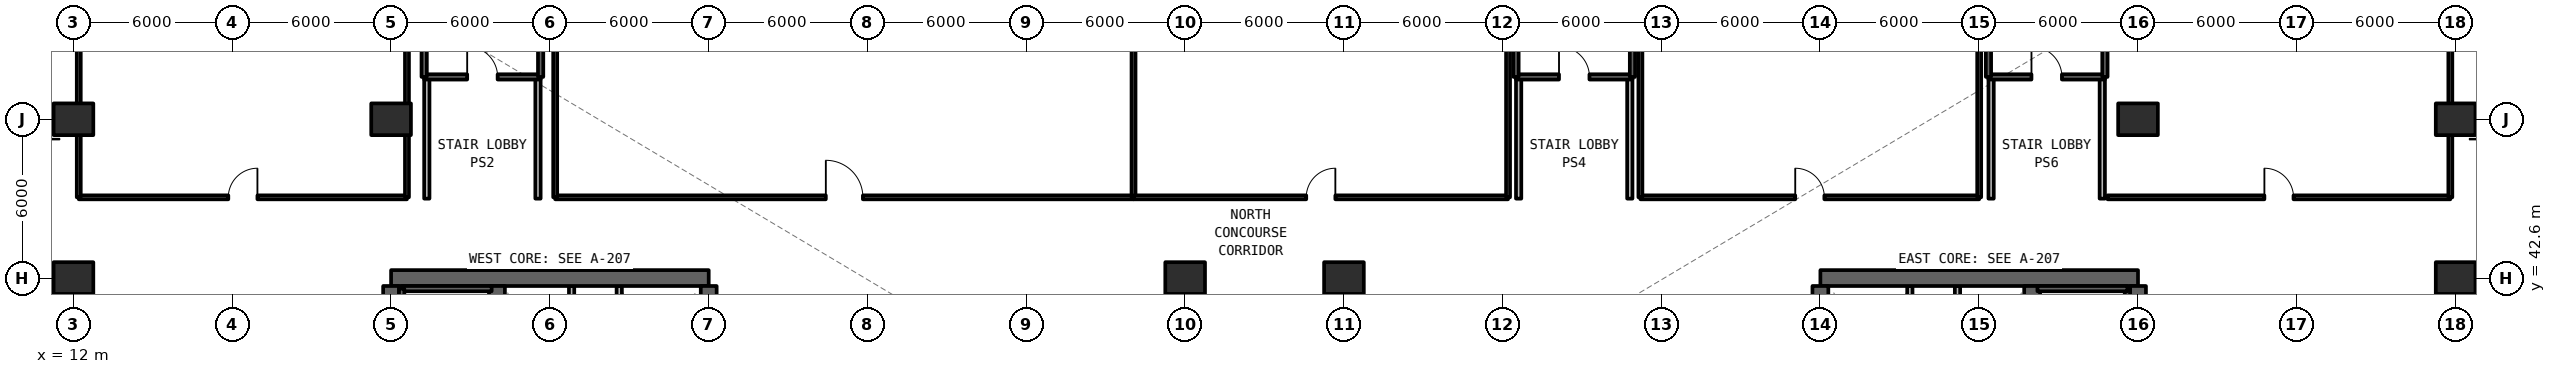
"""IFC4 building model, lengths in metres.
Left out: names, types, materials, properties, quantities, classifications, styles, units other than length and angle.
Written with IfcOpenShell. Run it as: python <this file> out.ifc"""

import sys

from ifc_helpers import new_model, si_unit, direction, frame, frame_2d, origin, origin_2d, place, context, subcontext, project, spatial, rectangle, extrude, element, fill, save


model = new_model("IFC4")
c1 = context("Model", 3, precision=1e-05, world=origin(), true_north=direction((0.0, 1.0)))
c2 = subcontext(c1, "Body", "Model", "MODEL_VIEW")
j1 = project(units=[si_unit("LENGTHUNIT", "METRE"), si_unit("PLANEANGLEUNIT", "RADIAN")], contexts=[c1])
p1 = place(None, origin())
s1 = spatial("IfcSite", under=j1, at=p1, CompositionType="ELEMENT")
p2 = place(p1, origin())
s2 = spatial("IfcBuilding", under=s1, at=p2, CompositionType="ELEMENT")
p3 = place(p2, frame((0.0, 0.0, 24.09)))
s3 = spatial("IfcBuildingStorey", under=s2, at=p3, CompositionType="ELEMENT", Elevation=24.09)
p4 = place(p3, frame((36.0, 42.6, 0.0), z_axis=(0.0, 0.0, 1.0), x_axis=(-1.0, 0.0, 0.0)))
e1 = element("IfcWall", 1, at=p4, inside=s3, PredefinedType="SHEAR", context=c2, shape_type="SweptSolid", body=[
    extrude(rectangle(XDim=12.0, YDim=0.6, at=frame_2d((6.0, 0.0))), origin(), (0.0, 0.0, 1.0), 4.95),
])
p5 = place(p3, frame((24.0, 24.9, 0.0), z_axis=(0.0, 0.0, 1.0), x_axis=(0.0, 1.0, 0.0)))
e2 = element("IfcWall", 2, at=p5, inside=s3, PredefinedType="SHEAR", context=c2, shape_type="SweptSolid", body=[
    extrude(rectangle(XDim=17.4, YDim=0.6, at=frame_2d((8.7, 0.0))), origin(), (0.0, 0.0, 1.0), 4.95),
])
p6 = place(p3, frame((36.0, 36.8, 0.0), z_axis=(0.0, 0.0, 1.0), x_axis=(0.0, 1.0, 0.0)))
e3 = element("IfcWall", 3, at=p6, inside=s3, PredefinedType="SHEAR", context=c2, shape_type="SweptSolid", body=[
    extrude(rectangle(XDim=5.5, YDim=0.6, at=frame_2d((2.75, 0.0))), origin(), (0.0, 0.0, 1.0), 4.95),
])
p7 = place(p3, frame((28.0, 24.9, 0.0), z_axis=(0.0, 0.0, 1.0), x_axis=(0.0, 1.0, 0.0)))
e4 = element("IfcWall", 4, at=p7, inside=s3, PredefinedType="SHEAR", context=c2, shape_type="SweptSolid", body=[
    extrude(rectangle(XDim=17.4, YDim=0.6, at=frame_2d((8.7, 0.0))), origin(), (0.0, 0.0, 1.0), 4.95),
])
p8 = place(p7, frame((0.35, 0.0, 0.0)))
e5 = element("IfcOpeningElement", 5, at=p8, cuts=e4, PredefinedType="OPENING", context=c2, shape_type="SweptSolid", body=[
    extrude(rectangle(XDim=1.15, YDim=2.15, at=frame_2d((0.575, 1.075))), frame((0.0, 0.31, 0.0), z_axis=(0.0, -1.0, 0.0), x_axis=(1.0, 0.0, 0.0)), (0.0, 0.0, 1.0), 0.62),
])
p9 = place(p7, frame((9.55, 0.0, 0.0)))
e6 = element("IfcOpeningElement", 6, at=p9, cuts=e4, PredefinedType="OPENING", context=c2, shape_type="SweptSolid", body=[
    extrude(rectangle(XDim=1.15, YDim=2.15, at=frame_2d((0.575, 1.075))), frame((0.0, 0.31, 0.0), z_axis=(0.0, -1.0, 0.0), x_axis=(1.0, 0.0, 0.0)), (0.0, 0.0, 1.0), 0.62),
])
p10 = place(p3, frame((90.0, 42.6, 0.0), z_axis=(0.0, 0.0, 1.0), x_axis=(-1.0, 0.0, 0.0)))
e7 = element("IfcWall", 7, at=p10, inside=s3, PredefinedType="SHEAR", context=c2, shape_type="SweptSolid", body=[
    extrude(rectangle(XDim=12.0, YDim=0.6, at=frame_2d((6.0, 0.0))), origin(), (0.0, 0.0, 1.0), 4.95),
])
p11 = place(p3, frame((90.0, 24.9, 0.0), z_axis=(0.0, 0.0, 1.0), x_axis=(0.0, 1.0, 0.0)))
e8 = element("IfcWall", 8, at=p11, inside=s3, PredefinedType="SHEAR", context=c2, shape_type="SweptSolid", body=[
    extrude(rectangle(XDim=17.4, YDim=0.6, at=frame_2d((8.7, 0.0))), origin(), (0.0, 0.0, 1.0), 4.95),
])
p12 = place(p3, frame((78.0, 36.8, 0.0), z_axis=(0.0, 0.0, 1.0), x_axis=(0.0, 1.0, 0.0)))
e9 = element("IfcWall", 9, at=p12, inside=s3, PredefinedType="SHEAR", context=c2, shape_type="SweptSolid", body=[
    extrude(rectangle(XDim=5.5, YDim=0.6, at=frame_2d((2.75, 0.0))), origin(), (0.0, 0.0, 1.0), 4.95),
])
p13 = place(p3, frame((86.0, 24.9, 0.0), z_axis=(0.0, 0.0, 1.0), x_axis=(0.0, 1.0, 0.0)))
e10 = element("IfcWall", 10, at=p13, inside=s3, PredefinedType="SHEAR", context=c2, shape_type="SweptSolid", body=[
    extrude(rectangle(XDim=17.4, YDim=0.6, at=frame_2d((8.7, 0.0))), origin(), (0.0, 0.0, 1.0), 4.95),
])
p14 = place(p13, frame((0.35, 0.0, 0.0)))
e11 = element("IfcOpeningElement", 11, at=p14, cuts=e10, PredefinedType="OPENING", context=c2, shape_type="SweptSolid", body=[
    extrude(rectangle(XDim=1.15, YDim=2.15, at=frame_2d((0.575, 1.075))), frame((0.0, 0.31, 0.0), z_axis=(0.0, -1.0, 0.0), x_axis=(1.0, 0.0, 0.0)), (0.0, 0.0, 1.0), 0.62),
])
p15 = place(p13, frame((9.55, 0.0, 0.0)))
e12 = element("IfcOpeningElement", 12, at=p15, cuts=e10, PredefinedType="OPENING", context=c2, shape_type="SweptSolid", body=[
    extrude(rectangle(XDim=1.15, YDim=2.15, at=frame_2d((0.575, 1.075))), frame((0.0, 0.31, 0.0), z_axis=(0.0, -1.0, 0.0), x_axis=(1.0, 0.0, 0.0)), (0.0, 0.0, 1.0), 0.62),
])
p16 = place(p3, frame((12.0, 42.6, 0.0), z_axis=(0.0, 0.0, 1.0), x_axis=(1.0, 0.0, 0.0)))
e13 = element("IfcColumn", 13, at=p16, inside=s3, PredefinedType="COLUMN", context=c2, shape_type="SweptSolid", body=[
    extrude(rectangle(XDim=1.5, YDim=1.2, at=origin_2d()), origin(), (0.0, 0.0, 1.0), 4.71),
])
for number, where, z_axis, x_axis in (
    (14, (54.0, 42.6, 0.0), (0.0, 0.0, 1.0), (1.0, 0.0, 0.0)),
    (15, (60.0, 42.6, 0.0), (0.0, 0.0, 1.0), (1.0, 0.0, 0.0)),
):
    element("IfcColumn", number, at=place(p3, frame(where, z_axis=z_axis, x_axis=x_axis)), inside=s3, PredefinedType="COLUMN", context=c2, shape_type="SweptSolid", body=[
        extrude(rectangle(XDim=1.5, YDim=1.2, at=origin_2d()), origin(), (0.0, 0.0, 1.0), 4.95),
    ])
for number, where, z_axis, x_axis in (
    (16, (102.0, 42.6, 0.0), (0.0, 0.0, 1.0), (1.0, 0.0, 0.0)),
    (17, (12.0, 48.6, 0.0), (0.0, 0.0, 1.0), (1.0, 0.0, 0.0)),
):
    element("IfcColumn", number, at=place(p3, frame(where, z_axis=z_axis, x_axis=x_axis)), inside=s3, PredefinedType="COLUMN", context=c2, shape_type="SweptSolid", body=[
        extrude(rectangle(XDim=1.5, YDim=1.2, at=origin_2d()), origin(), (0.0, 0.0, 1.0), 4.71),
    ])
for number, where, z_axis, x_axis in (
    (18, (24.0, 48.6, 0.0), (0.0, 0.0, 1.0), (1.0, 0.0, 0.0)),
    (19, (90.0, 48.6, 0.0), (0.0, 0.0, 1.0), (1.0, 0.0, 0.0)),
):
    element("IfcColumn", number, at=place(p3, frame(where, z_axis=z_axis, x_axis=x_axis)), inside=s3, PredefinedType="COLUMN", context=c2, shape_type="SweptSolid", body=[
        extrude(rectangle(XDim=1.5, YDim=1.2, at=origin_2d()), origin(), (0.0, 0.0, 1.0), 4.95),
    ])
p17 = place(p3, frame((102.0, 48.6, 0.0), z_axis=(0.0, 0.0, 1.0), x_axis=(1.0, 0.0, 0.0)))
e20 = element("IfcColumn", 20, at=p17, inside=s3, PredefinedType="COLUMN", context=c2, shape_type="SweptSolid", body=[
    extrude(rectangle(XDim=1.5, YDim=1.2, at=origin_2d()), origin(), (0.0, 0.0, 1.0), 4.71),
])
for number, where, z_axis, x_axis in (
    (21, (30.82, 36.88, 0.0), (0.0, 0.0, 1.0), (0.0, 1.0, 0.0)),
    (22, (32.62, 36.88, 0.0), (0.0, 0.0, 1.0), (0.0, 1.0, 0.0)),
    (23, (83.18, 36.88, 0.0), (0.0, 0.0, 1.0), (0.0, 1.0, 0.0)),
    (24, (81.38, 36.88, 0.0), (0.0, 0.0, 1.0), (0.0, 1.0, 0.0)),
):
    element("IfcWall", number, at=place(p3, frame(where, z_axis=z_axis, x_axis=x_axis)), inside=s3, PredefinedType="SOLIDWALL", context=c2, shape_type="SweptSolid", body=[
        extrude(rectangle(XDim=5.42, YDim=0.2, at=frame_2d((2.71, 0.0))), origin(), (0.0, 0.0, 1.0), 3.93),
    ])
for number, where, z_axis, x_axis in (
    (25, (25.35, 45.6, 0.0), (0.0, 0.0, 1.0), (0.0, 1.0, 0.0)),
    (26, (29.55, 45.6, 0.0), (0.0, 0.0, 1.0), (0.0, 1.0, 0.0)),
    (27, (66.6, 45.6, 0.0), (0.0, 0.0, 1.0), (0.0, 1.0, 0.0)),
    (28, (70.8, 45.6, 0.0), (0.0, 0.0, 1.0), (0.0, 1.0, 0.0)),
    (29, (84.45, 45.6, 0.0), (0.0, 0.0, 1.0), (0.0, 1.0, 0.0)),
    (30, (88.65, 45.6, 0.0), (0.0, 0.0, 1.0), (0.0, 1.0, 0.0)),
):
    element("IfcWall", number, at=place(p3, frame(where, z_axis=z_axis, x_axis=x_axis)), inside=s3, PredefinedType="SOLIDWALL", context=c2, shape_type="SweptSolid", body=[
        extrude(rectangle(XDim=4.6, YDim=0.2, at=frame_2d((2.3, 0.0))), origin(), (0.0, 0.0, 1.0), 3.93),
    ])
p18 = place(p3, frame((30.2, 45.65, 0.0), z_axis=(0.0, 0.0, 1.0), x_axis=(1.0, 0.0, 0.0)))
e31 = element("IfcWall", 31, at=p18, inside=s3, PredefinedType="SOLIDWALL", context=c2, shape_type="SweptSolid", body=[
    extrude(rectangle(XDim=21.85, YDim=0.15, at=frame_2d((10.925, 0.0))), origin(), (0.0, 0.0, 1.0), 3.93),
])
p19 = place(p18, frame((10.225, 0.0, 0.0)))
e32 = element("IfcOpeningElement", 32, at=p19, cuts=e31, PredefinedType="OPENING", context=c2, shape_type="SweptSolid", body=[
    extrude(rectangle(XDim=1.4, YDim=2.15, at=frame_2d((0.7, 1.075))), frame((0.0, 0.085, 0.0), z_axis=(0.0, -1.0, 0.0), x_axis=(1.0, 0.0, 0.0)), (0.0, 0.0, 1.0), 0.17),
])
p20 = place(p3, frame((30.2, 45.65, 0.0), z_axis=(0.0, 0.0, 1.0), x_axis=(0.0, 1.0, 0.0)))
e33 = element("IfcWall", 33, at=p20, inside=s3, PredefinedType="SOLIDWALL", context=c2, shape_type="SweptSolid", body=[
    extrude(rectangle(XDim=16.27, YDim=0.15, at=frame_2d((8.135, 0.0))), origin(), (0.0, 0.0, 1.0), 3.687),
])
p21 = place(p3, frame((52.05, 45.65, 0.0), z_axis=(0.0, 0.0, 1.0), x_axis=(0.0, 1.0, 0.0)))
e34 = element("IfcWall", 34, at=p21, inside=s3, PredefinedType="SOLIDWALL", context=c2, shape_type="SweptSolid", body=[
    extrude(rectangle(XDim=16.27, YDim=0.15, at=frame_2d((8.135, 0.0))), origin(), (0.0, 0.0, 1.0), 3.93),
])
p22 = place(p3, frame((52.05, 45.65, 0.0), z_axis=(0.0, 0.0, 1.0), x_axis=(1.0, 0.0, 0.0)))
e35 = element("IfcWall", 35, at=p22, inside=s3, PredefinedType="SOLIDWALL", context=c2, shape_type="SweptSolid", body=[
    extrude(rectangle(XDim=14.15, YDim=0.15, at=frame_2d((7.075, 0.0))), origin(), (0.0, 0.0, 1.0), 3.93),
])
p23 = place(p22, frame((6.525, 0.0, 0.0)))
e36 = element("IfcOpeningElement", 36, at=p23, cuts=e35, PredefinedType="OPENING", context=c2, shape_type="SweptSolid", body=[
    extrude(rectangle(XDim=1.1, YDim=2.15, at=frame_2d((0.55, 1.075))), frame((0.0, 0.085, 0.0), z_axis=(0.0, -1.0, 0.0), x_axis=(1.0, 0.0, 0.0)), (0.0, 0.0, 1.0), 0.17),
])
p24 = place(p3, frame((66.2, 45.65, 0.0), z_axis=(0.0, 0.0, 1.0), x_axis=(0.0, 1.0, 0.0)))
e37 = element("IfcWall", 37, at=p24, inside=s3, PredefinedType="SOLIDWALL", context=c2, shape_type="SweptSolid", body=[
    extrude(rectangle(XDim=16.27, YDim=0.15, at=frame_2d((8.135, 0.0))), origin(), (0.0, 0.0, 1.0), 3.687),
])
p25 = place(p3, frame((71.2, 45.65, 0.0), z_axis=(0.0, 0.0, 1.0), x_axis=(1.0, 0.0, 0.0)))
e38 = element("IfcWall", 38, at=p25, inside=s3, PredefinedType="SOLIDWALL", context=c2, shape_type="SweptSolid", body=[
    extrude(rectangle(XDim=12.8, YDim=0.15, at=frame_2d((6.4, 0.0))), origin(), (0.0, 0.0, 1.0), 3.93),
])
p26 = place(p25, frame((5.85, 0.0, 0.0)))
e39 = element("IfcOpeningElement", 39, at=p26, cuts=e38, PredefinedType="OPENING", context=c2, shape_type="SweptSolid", body=[
    extrude(rectangle(XDim=1.1, YDim=2.15, at=frame_2d((0.55, 1.075))), frame((0.0, 0.085, 0.0), z_axis=(0.0, -1.0, 0.0), x_axis=(1.0, 0.0, 0.0)), (0.0, 0.0, 1.0), 0.17),
])
p27 = place(p3, frame((71.2, 45.65, 0.0), z_axis=(0.0, 0.0, 1.0), x_axis=(0.0, 1.0, 0.0)))
e40 = element("IfcWall", 40, at=p27, inside=s3, PredefinedType="SOLIDWALL", context=c2, shape_type="SweptSolid", body=[
    extrude(rectangle(XDim=16.27, YDim=0.15, at=frame_2d((8.135, 0.0))), origin(), (0.0, 0.0, 1.0), 3.93),
])
p28 = place(p3, frame((84.0, 45.65, 0.0), z_axis=(0.0, 0.0, 1.0), x_axis=(0.0, 1.0, 0.0)))
e41 = element("IfcWall", 41, at=p28, inside=s3, PredefinedType="SOLIDWALL", context=c2, shape_type="SweptSolid", body=[
    extrude(rectangle(XDim=16.27, YDim=0.15, at=frame_2d((8.135, 0.0))), origin(), (0.0, 0.0, 1.0), 3.687),
])
p29 = place(p3, frame((12.2, 45.65, 0.0), z_axis=(0.0, 0.0, 1.0), x_axis=(1.0, 0.0, 0.0)))
e42 = element("IfcWall", 42, at=p29, inside=s3, PredefinedType="SOLIDWALL", context=c2, shape_type="SweptSolid", body=[
    extrude(rectangle(XDim=12.4, YDim=0.15, at=frame_2d((6.2, 0.0))), origin(), (0.0, 0.0, 1.0), 3.93),
])
p30 = place(p29, frame((5.65, 0.0, 0.0)))
e43 = element("IfcOpeningElement", 43, at=p30, cuts=e42, PredefinedType="OPENING", context=c2, shape_type="SweptSolid", body=[
    extrude(rectangle(XDim=1.1, YDim=2.15, at=frame_2d((0.55, 1.075))), frame((0.0, 0.085, 0.0), z_axis=(0.0, -1.0, 0.0), x_axis=(1.0, 0.0, 0.0)), (0.0, 0.0, 1.0), 0.17),
])
for number, where, z_axis, x_axis in (
    (44, (12.2, 45.65, 0.0), (0.0, 0.0, 1.0), (0.0, 1.0, 0.0)),
    (45, (24.6, 45.65, 0.0), (0.0, 0.0, 1.0), (0.0, 1.0, 0.0)),
):
    element("IfcWall", number, at=place(p3, frame(where, z_axis=z_axis, x_axis=x_axis)), inside=s3, PredefinedType="SOLIDWALL", context=c2, shape_type="SweptSolid", body=[
        extrude(rectangle(XDim=16.27, YDim=0.15, at=frame_2d((8.135, 0.0))), origin(), (0.0, 0.0, 1.0), 3.93),
    ])
p31 = place(p3, frame((88.85, 45.65, 0.0), z_axis=(0.0, 0.0, 1.0), x_axis=(1.0, 0.0, 0.0)))
e46 = element("IfcWall", 46, at=p31, inside=s3, PredefinedType="SOLIDWALL", context=c2, shape_type="SweptSolid", body=[
    extrude(rectangle(XDim=12.95, YDim=0.15, at=frame_2d((6.475, 0.0))), origin(), (0.0, 0.0, 1.0), 3.93),
])
p32 = place(p31, frame((5.925, 0.0, 0.0)))
e47 = element("IfcOpeningElement", 47, at=p32, cuts=e46, PredefinedType="OPENING", context=c2, shape_type="SweptSolid", body=[
    extrude(rectangle(XDim=1.1, YDim=2.15, at=frame_2d((0.55, 1.075))), frame((0.0, 0.085, 0.0), z_axis=(0.0, -1.0, 0.0), x_axis=(1.0, 0.0, 0.0)), (0.0, 0.0, 1.0), 0.17),
])
p33 = place(p3, frame((101.8, 45.65, 0.0), z_axis=(0.0, 0.0, 1.0), x_axis=(0.0, 1.0, 0.0)))
e48 = element("IfcWall", 48, at=p33, inside=s3, PredefinedType="SOLIDWALL", context=c2, shape_type="SweptSolid", body=[
    extrude(rectangle(XDim=16.27, YDim=0.15, at=frame_2d((8.135, 0.0))), origin(), (0.0, 0.0, 1.0), 3.93),
])
p34 = place(p3, frame((27.8, 42.2, 0.0), z_axis=(0.0, 0.0, 1.0), x_axis=(-1.0, 0.0, 0.0)))
e49 = element("IfcWall", 49, at=p34, inside=s3, PredefinedType="SOLIDWALL", context=c2, shape_type="SweptSolid", body=[
    extrude(rectangle(XDim=3.4, YDim=0.2, at=frame_2d((1.7, 0.0))), origin(), (0.0, 0.0, 1.0), 4.95),
])
for number, where, z_axis, x_axis in (
    (50, (24.4, 42.2, 0.0), (0.0, 0.0, 1.0), (0.0, -1.0, 0.0)),
    (51, (89.6, 34.2, 0.0), (0.0, 0.0, 1.0), (0.0, 1.0, 0.0)),
):
    element("IfcWall", number, at=place(p3, frame(where, z_axis=z_axis, x_axis=x_axis)), inside=s3, PredefinedType="SOLIDWALL", context=c2, shape_type="SweptSolid", body=[
        extrude(rectangle(XDim=8.0, YDim=0.2, at=frame_2d((4.0, 0.0))), origin(), (0.0, 0.0, 1.0), 4.95),
    ])
p35 = place(p3, frame((89.6, 42.2, 0.0), z_axis=(0.0, 0.0, 1.0), x_axis=(-1.0, 0.0, 0.0)))
e52 = element("IfcWall", 52, at=p35, inside=s3, PredefinedType="SOLIDWALL", context=c2, shape_type="SweptSolid", body=[
    extrude(rectangle(XDim=3.4, YDim=0.2, at=frame_2d((1.7, 0.0))), origin(), (0.0, 0.0, 1.0), 4.95),
])
p36 = place(p3, frame((25.25, 50.2, 0.0), z_axis=(0.0, 0.0, 1.0), x_axis=(1.0, 0.0, 0.0)))
e53 = element("IfcWall", 53, at=p36, inside=s3, PredefinedType="SOLIDWALL", context=c2, shape_type="SweptSolid", body=[
    extrude(rectangle(XDim=4.4, YDim=0.2, at=frame_2d((2.2, 0.0))), origin(), (0.0, 0.0, 1.0), 4.95),
])
p37 = place(p36, frame((1.625, 0.0, 0.0)))
e54 = element("IfcOpeningElement", 54, at=p37, cuts=e53, PredefinedType="OPENING", context=c2, shape_type="SweptSolid", body=[
    extrude(rectangle(XDim=1.15, YDim=2.15, at=frame_2d((0.575, 1.075))), frame((0.0, 0.11, 0.0), z_axis=(0.0, -1.0, 0.0), x_axis=(1.0, 0.0, 0.0)), (0.0, 0.0, 1.0), 0.22),
])
for number, where, z_axis, x_axis in (
    (55, (29.65, 50.2, 0.0), (0.0, 0.0, 1.0), (0.0, 1.0, 0.0)),
    (56, (25.25, 58.8, 0.0), (0.0, 0.0, 1.0), (0.0, -1.0, 0.0)),
):
    element("IfcWall", number, at=place(p3, frame(where, z_axis=z_axis, x_axis=x_axis)), inside=s3, PredefinedType="SOLIDWALL", context=c2, shape_type="SweptSolid", body=[
        extrude(rectangle(XDim=8.6, YDim=0.2, at=frame_2d((4.3, 0.0))), origin(), (0.0, 0.0, 1.0), 4.95),
    ])
p38 = place(p3, frame((66.5, 50.2, 0.0), z_axis=(0.0, 0.0, 1.0), x_axis=(1.0, 0.0, 0.0)))
e57 = element("IfcWall", 57, at=p38, inside=s3, PredefinedType="SOLIDWALL", context=c2, shape_type="SweptSolid", body=[
    extrude(rectangle(XDim=4.4, YDim=0.2, at=frame_2d((2.2, 0.0))), origin(), (0.0, 0.0, 1.0), 4.95),
])
p39 = place(p38, frame((1.625, 0.0, 0.0)))
e58 = element("IfcOpeningElement", 58, at=p39, cuts=e57, PredefinedType="OPENING", context=c2, shape_type="SweptSolid", body=[
    extrude(rectangle(XDim=1.15, YDim=2.15, at=frame_2d((0.575, 1.075))), frame((0.0, 0.11, 0.0), z_axis=(0.0, -1.0, 0.0), x_axis=(1.0, 0.0, 0.0)), (0.0, 0.0, 1.0), 0.22),
])
for number, where, z_axis, x_axis in (
    (59, (70.9, 50.2, 0.0), (0.0, 0.0, 1.0), (0.0, 1.0, 0.0)),
    (60, (66.5, 58.8, 0.0), (0.0, 0.0, 1.0), (0.0, -1.0, 0.0)),
):
    element("IfcWall", number, at=place(p3, frame(where, z_axis=z_axis, x_axis=x_axis)), inside=s3, PredefinedType="SOLIDWALL", context=c2, shape_type="SweptSolid", body=[
        extrude(rectangle(XDim=8.6, YDim=0.2, at=frame_2d((4.3, 0.0))), origin(), (0.0, 0.0, 1.0), 4.95),
    ])
p40 = place(p3, frame((84.35, 50.2, 0.0), z_axis=(0.0, 0.0, 1.0), x_axis=(1.0, 0.0, 0.0)))
e61 = element("IfcWall", 61, at=p40, inside=s3, PredefinedType="SOLIDWALL", context=c2, shape_type="SweptSolid", body=[
    extrude(rectangle(XDim=4.4, YDim=0.2, at=frame_2d((2.2, 0.0))), origin(), (0.0, 0.0, 1.0), 4.95),
])
p41 = place(p40, frame((1.625, 0.0, 0.0)))
e62 = element("IfcOpeningElement", 62, at=p41, cuts=e61, PredefinedType="OPENING", context=c2, shape_type="SweptSolid", body=[
    extrude(rectangle(XDim=1.15, YDim=2.15, at=frame_2d((0.575, 1.075))), frame((0.0, 0.11, 0.0), z_axis=(0.0, -1.0, 0.0), x_axis=(1.0, 0.0, 0.0)), (0.0, 0.0, 1.0), 0.22),
])
for number, where, z_axis, x_axis in (
    (63, (88.75, 50.2, 0.0), (0.0, 0.0, 1.0), (0.0, 1.0, 0.0)),
    (64, (84.35, 58.8, 0.0), (0.0, 0.0, 1.0), (0.0, -1.0, 0.0)),
):
    element("IfcWall", number, at=place(p3, frame(where, z_axis=z_axis, x_axis=x_axis)), inside=s3, PredefinedType="SOLIDWALL", context=c2, shape_type="SweptSolid", body=[
        extrude(rectangle(XDim=8.6, YDim=0.2, at=frame_2d((4.3, 0.0))), origin(), (0.0, 0.0, 1.0), 4.95),
    ])
p42 = place(p19, origin())
e65 = element("IfcDoor", 65, at=p42, inside=s3, OperationType="SINGLE_SWING_LEFT", PredefinedType="DOOR", context=c2, shape_type="SweptSolid", body=[
    extrude(rectangle(XDim=1.4, YDim=2.15, at=frame_2d((0.7, 1.075))), frame((0.0, 0.025, 0.0), z_axis=(0.0, -1.0, 0.0), x_axis=(1.0, 0.0, 0.0)), (0.0, 0.0, 1.0), 0.05),
])
fill(e32, e65)
p43 = place(p23, origin())
e66 = element("IfcDoor", 66, at=p43, inside=s3, OperationType="SINGLE_SWING_RIGHT", PredefinedType="DOOR", context=c2, shape_type="SweptSolid", body=[
    extrude(rectangle(XDim=1.1, YDim=2.15, at=frame_2d((0.55, 1.075))), frame((0.0, 0.025, 0.0), z_axis=(0.0, -1.0, 0.0), x_axis=(1.0, 0.0, 0.0)), (0.0, 0.0, 1.0), 0.05),
])
fill(e36, e66)
p44 = place(p26, origin())
e67 = element("IfcDoor", 67, at=p44, inside=s3, OperationType="SINGLE_SWING_LEFT", PredefinedType="DOOR", context=c2, shape_type="SweptSolid", body=[
    extrude(rectangle(XDim=1.1, YDim=2.15, at=frame_2d((0.55, 1.075))), frame((0.0, 0.025, 0.0), z_axis=(0.0, -1.0, 0.0), x_axis=(1.0, 0.0, 0.0)), (0.0, 0.0, 1.0), 0.05),
])
fill(e39, e67)
p45 = place(p30, origin())
e68 = element("IfcDoor", 68, at=p45, inside=s3, OperationType="SINGLE_SWING_RIGHT", PredefinedType="DOOR", context=c2, shape_type="SweptSolid", body=[
    extrude(rectangle(XDim=1.1, YDim=2.15, at=frame_2d((0.55, 1.075))), frame((0.0, 0.025, 0.0), z_axis=(0.0, -1.0, 0.0), x_axis=(1.0, 0.0, 0.0)), (0.0, 0.0, 1.0), 0.05),
])
fill(e43, e68)
p46 = place(p32, origin())
e69 = element("IfcDoor", 69, at=p46, inside=s3, OperationType="SINGLE_SWING_LEFT", PredefinedType="DOOR", context=c2, shape_type="SweptSolid", body=[
    extrude(rectangle(XDim=1.1, YDim=2.15, at=frame_2d((0.55, 1.075))), frame((0.0, 0.025, 0.0), z_axis=(0.0, -1.0, 0.0), x_axis=(1.0, 0.0, 0.0)), (0.0, 0.0, 1.0), 0.05),
])
fill(e47, e69)
p47 = place(p37, origin())
e70 = element("IfcDoor", 70, at=p47, inside=s3, OperationType="SINGLE_SWING_LEFT", PredefinedType="DOOR", context=c2, shape_type="SweptSolid", body=[
    extrude(rectangle(XDim=1.15, YDim=2.15, at=frame_2d((0.575, 1.075))), frame((0.0, 0.025, 0.0), z_axis=(0.0, -1.0, 0.0), x_axis=(1.0, 0.0, 0.0)), (0.0, 0.0, 1.0), 0.05),
])
fill(e54, e70)
p48 = place(p39, origin())
e71 = element("IfcDoor", 71, at=p48, inside=s3, OperationType="SINGLE_SWING_LEFT", PredefinedType="DOOR", context=c2, shape_type="SweptSolid", body=[
    extrude(rectangle(XDim=1.15, YDim=2.15, at=frame_2d((0.575, 1.075))), frame((0.0, 0.025, 0.0), z_axis=(0.0, -1.0, 0.0), x_axis=(1.0, 0.0, 0.0)), (0.0, 0.0, 1.0), 0.05),
])
fill(e58, e71)
p49 = place(p41, origin())
e72 = element("IfcDoor", 72, at=p49, inside=s3, OperationType="SINGLE_SWING_LEFT", PredefinedType="DOOR", context=c2, shape_type="SweptSolid", body=[
    extrude(rectangle(XDim=1.15, YDim=2.15, at=frame_2d((0.575, 1.075))), frame((0.0, 0.025, 0.0), z_axis=(0.0, -1.0, 0.0), x_axis=(1.0, 0.0, 0.0)), (0.0, 0.0, 1.0), 0.05),
])
fill(e62, e72)
save(model, sys.argv[1])
